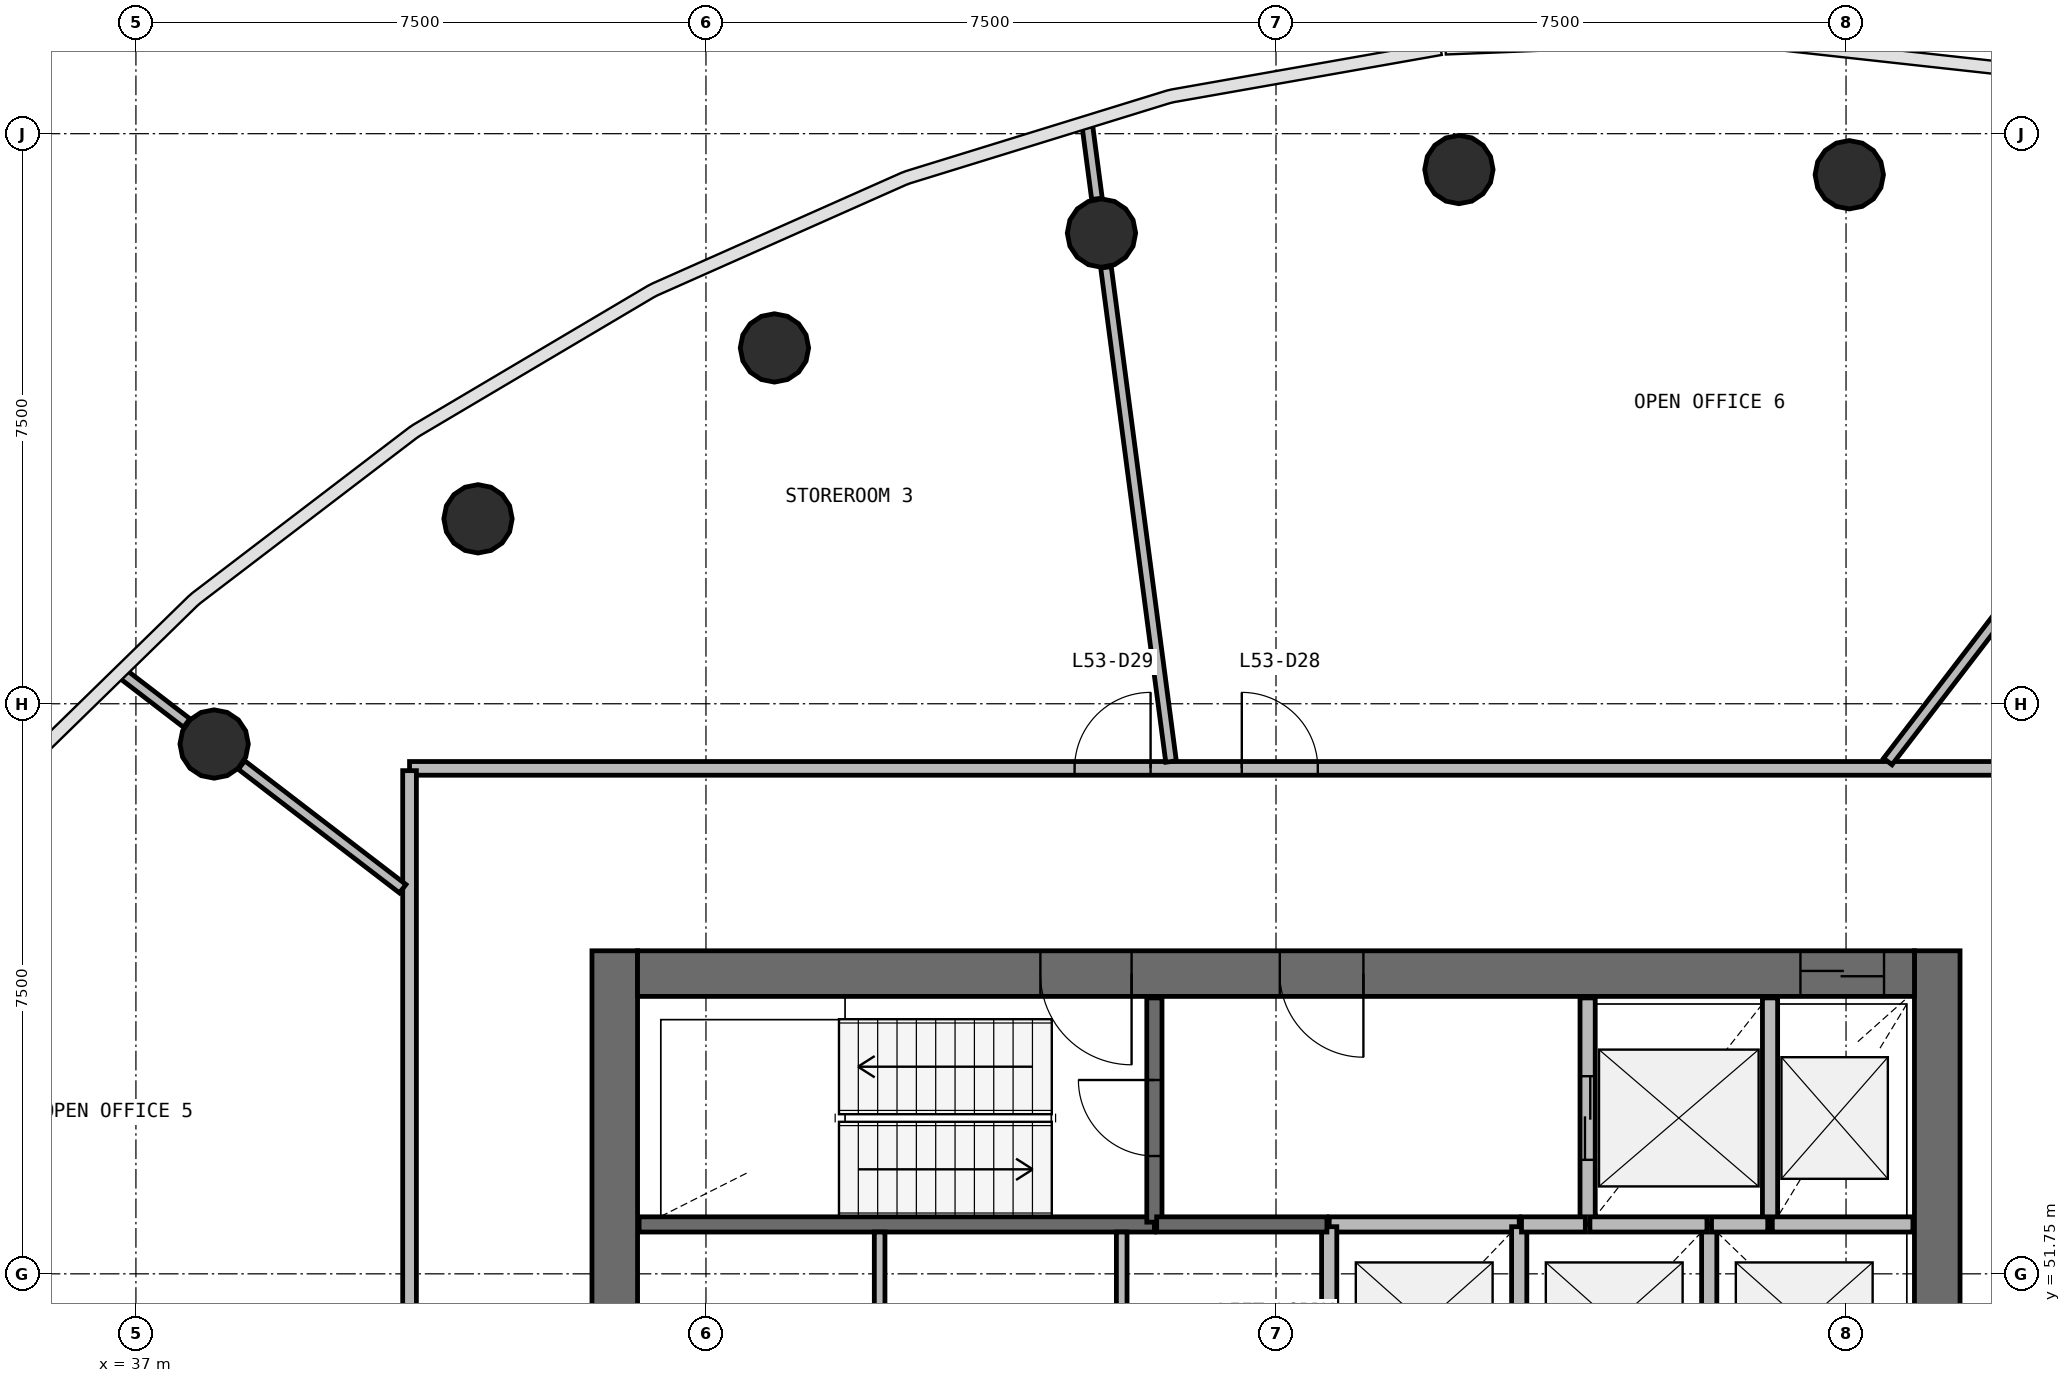
"""IFC4 building model, lengths in metres.
Left out: names, types, materials, properties, quantities, classifications, styles, units other than length and angle.
Written with IfcOpenShell. Run it as: python <this file> out.ifc"""

import sys

from ifc_helpers import new_model, si_unit, direction, frame, frame_2d, origin, origin_2d, place, context, subcontext, project, spatial, rectangle, circle, extrude, source, transform, mapped, element, fill, save


model = new_model("IFC4")
c1 = context("Model", 3, precision=1e-05, world=origin(), true_north=direction((0.0, 1.0)))
c2 = subcontext(c1, "Body", "Model", "MODEL_VIEW")
j1 = project(units=[si_unit("LENGTHUNIT", "METRE"), si_unit("PLANEANGLEUNIT", "RADIAN")], contexts=[c1])
p1 = place(None, origin())
s1 = spatial("IfcSite", under=j1, at=p1, CompositionType="ELEMENT")
p2 = place(p1, origin())
s2 = spatial("IfcBuilding", under=s1, at=p2, CompositionType="ELEMENT")
p3 = place(p2, frame((0.0, 0.0, 218.9)))
s3 = spatial("IfcBuildingStorey", under=s2, at=p3, CompositionType="ELEMENT", Elevation=218.9)
p4 = place(p3, frame((60.7, 40.0, 0.0), z_axis=(0.0, 0.0, 1.0), x_axis=(0.0, 1.0, 0.0)))
e1 = element("IfcWall", 1, at=p4, inside=s3, PredefinedType="SHEAR", context=c2, shape_type="SweptSolid", body=[
    extrude(rectangle(XDim=16.0, YDim=0.6, at=frame_2d((8.0, 0.0))), origin(), (0.0, 0.0, 1.0), 3.9),
])
p5 = place(p4, frame((7.1, 0.0, 0.0)))
e2 = element("IfcOpeningElement", 2, at=p5, cuts=e1, PredefinedType="OPENING", context=c2, shape_type="SweptSolid", body=[
    extrude(rectangle(XDim=1.8, YDim=2.1, at=frame_2d((0.9, 1.05))), frame((0.0, 0.31, 0.0), z_axis=(0.0, -1.0, 0.0), x_axis=(1.0, 0.0, 0.0)), (0.0, 0.0, 1.0), 0.62),
])
p6 = place(p3, frame((43.3, 56.0, 0.0), z_axis=(0.0, 0.0, 1.0), x_axis=(0.0, -1.0, 0.0)))
e3 = element("IfcWall", 3, at=p6, inside=s3, PredefinedType="SHEAR", context=c2, shape_type="SweptSolid", body=[
    extrude(rectangle(XDim=16.0, YDim=0.6, at=frame_2d((8.0, 0.0))), origin(), (0.0, 0.0, 1.0), 3.9),
])
p7 = place(p6, frame((7.1, 0.0, 0.0)))
e4 = element("IfcOpeningElement", 4, at=p7, cuts=e3, PredefinedType="OPENING", context=c2, shape_type="SweptSolid", body=[
    extrude(rectangle(XDim=1.8, YDim=2.1, at=frame_2d((0.9, 1.05))), frame((0.0, 0.31, 0.0), z_axis=(0.0, -1.0, 0.0), x_axis=(1.0, 0.0, 0.0)), (0.0, 0.0, 1.0), 0.62),
])
p8 = place(p3, frame((60.4, 55.7, 0.0), z_axis=(0.0, 0.0, 1.0), x_axis=(-1.0, 0.0, 0.0)))
e5 = element("IfcWall", 5, at=p8, inside=s3, PredefinedType="SHEAR", context=c2, shape_type="SweptSolid", body=[
    extrude(rectangle(XDim=16.8, YDim=0.6, at=frame_2d((8.4, 0.0))), origin(), (0.0, 0.0, 1.0), 3.9),
])
p9 = place(p8, frame((0.4, 0.0, 0.0)))
e6 = element("IfcOpeningElement", 6, at=p9, cuts=e5, PredefinedType="OPENING", context=c2, shape_type="SweptSolid", body=[
    extrude(rectangle(XDim=1.1, YDim=2.1, at=frame_2d((0.55, 1.05))), frame((0.0, 0.31, 0.0), z_axis=(0.0, -1.0, 0.0), x_axis=(1.0, 0.0, 0.0)), (0.0, 0.0, 1.0), 0.62),
])
p10 = place(p8, frame((10.3, 0.0, 0.0)))
e7 = element("IfcOpeningElement", 7, at=p10, cuts=e5, PredefinedType="OPENING", context=c2, shape_type="SweptSolid", body=[
    extrude(rectangle(XDim=1.2, YDim=2.1, at=frame_2d((0.6, 1.05))), frame((0.0, 0.31, 0.0), z_axis=(0.0, -1.0, 0.0), x_axis=(1.0, 0.0, 0.0)), (0.0, 0.0, 1.0), 0.62),
])
p11 = place(p8, frame((7.25, 0.0, 0.0)))
e8 = element("IfcOpeningElement", 8, at=p11, cuts=e5, PredefinedType="OPENING", context=c2, shape_type="SweptSolid", body=[
    extrude(rectangle(XDim=1.1, YDim=2.1, at=frame_2d((0.55, 1.05))), frame((0.0, 0.31, 0.0), z_axis=(0.0, -1.0, 0.0), x_axis=(1.0, 0.0, 0.0)), (0.0, 0.0, 1.0), 0.62),
])
m1 = source(origin(), c2, "Body", "SweptSolid", [
    extrude(circle(Radius=0.45, at=origin_2d()), origin(), (0.0, 0.0, 1.0), 3.9),
])
for number, where, z_axis, x_axis in (
    (9, (59.543, 66.21, 0.0), (0.0, 0.0, 1.0), (1.0, 0.0, 0.0)),
    (10, (54.406, 66.278, 0.0), (0.0, 0.0, 1.0), (1.0, 0.0, 0.0)),
    (11, (49.704, 65.442, 0.0), (0.0, 0.0, 1.0), (1.0, 0.0, 0.0)),
    (12, (45.401, 63.931, 0.0), (0.0, 0.0, 1.0), (1.0, 0.0, 0.0)),
    (13, (41.501, 61.683, 0.0), (0.0, 0.0, 1.0), (1.0, 0.0, 0.0)),
    (14, (38.029, 58.72, 0.0), (0.0, 0.0, 1.0), (1.0, 0.0, 0.0)),
):
    element("IfcColumn", number, at=place(p3, frame(where, z_axis=z_axis, x_axis=x_axis)), inside=s3, PredefinedType="COLUMN", context=c2, shape_type="MappedRepresentation", body=[
        mapped(m1, transform((0.0, 0.0, 0.0), scale=1.0)),
    ])
p12 = place(p3, frame((43.62, 52.4, 0.0), z_axis=(0.0, 0.0, 1.0), x_axis=(1.0, 0.0, 0.0)))
e15 = element("IfcWall", 15, at=p12, inside=s3, PredefinedType="SOLIDWALL", context=c2, shape_type="SweptSolid", body=[
    extrude(rectangle(XDim=6.78, YDim=0.2, at=frame_2d((3.39, 0.0))), origin(), (0.0, 0.0, 1.0), 3.58),
])
p13 = place(p3, frame((50.4, 52.43, 0.0), z_axis=(0.0, 0.0, 1.0), x_axis=(0.0, 1.0, 0.0)))
e16 = element("IfcWall", 16, at=p13, inside=s3, PredefinedType="SOLIDWALL", context=c2, shape_type="SweptSolid", body=[
    extrude(rectangle(XDim=2.95, YDim=0.2, at=frame_2d((1.475, 0.0))), origin(), (0.0, 0.0, 1.0), 3.58),
])
p14 = place(p13, frame((0.87, 0.0, 0.0)))
e17 = element("IfcOpeningElement", 17, at=p14, cuts=e16, PredefinedType="OPENING", context=c2, shape_type="SweptSolid", body=[
    extrude(rectangle(XDim=1.0, YDim=2.1, at=frame_2d((0.5, 1.05))), frame((0.0, 0.11, 0.0), z_axis=(0.0, -1.0, 0.0), x_axis=(1.0, 0.0, 0.0)), (0.0, 0.0, 1.0), 0.22),
])
p15 = place(p3, frame((56.1, 55.38, 0.0), z_axis=(0.0, 0.0, 1.0), x_axis=(0.0, -1.0, 0.0)))
e18 = element("IfcWall", 18, at=p15, inside=s3, PredefinedType="SOLIDWALL", context=c2, shape_type="SweptSolid", body=[
    extrude(rectangle(XDim=2.98, YDim=0.2, at=frame_2d((1.49, 0.0))), origin(), (0.0, 0.0, 1.0), 3.58),
])
p16 = place(p15, frame((1.03, 0.0, 0.0)))
e19 = element("IfcOpeningElement", 19, at=p16, cuts=e18, PredefinedType="OPENING", context=c2, shape_type="SweptSolid", body=[
    extrude(rectangle(XDim=1.1, YDim=2.1, at=frame_2d((0.55, 1.05))), frame((0.0, 0.11, 0.0), z_axis=(0.0, -1.0, 0.0), x_axis=(1.0, 0.0, 0.0)), (0.0, 0.0, 1.0), 0.22),
])
p17 = place(p3, frame((58.5, 52.4, 0.0), z_axis=(0.0, 0.0, 1.0), x_axis=(0.0, 1.0, 0.0)))
e20 = element("IfcWall", 20, at=p17, inside=s3, PredefinedType="SOLIDWALL", context=c2, shape_type="SweptSolid", body=[
    extrude(rectangle(XDim=2.98, YDim=0.2, at=frame_2d((1.49, 0.0))), origin(), (0.0, 0.0, 1.0), 3.58),
])
p18 = place(p3, frame((55.2, 52.4, 0.0), z_axis=(0.0, 0.0, 1.0), x_axis=(-1.0, 0.0, 0.0)))
e21 = element("IfcWall", 21, at=p18, inside=s3, PredefinedType="SOLIDWALL", context=c2, shape_type="SweptSolid", body=[
    extrude(rectangle(XDim=2.5, YDim=0.2, at=frame_2d((1.25, 0.0))), origin(), (0.0, 0.0, 1.0), 3.58),
])
for number, where, z_axis, x_axis in (
    (22, (52.7, 52.37, 0.0), (0.0, 0.0, 1.0), (0.0, -1.0, 0.0)),
    (23, (55.2, 50.01, 0.0), (0.0, 0.0, 1.0), (0.0, 1.0, 0.0)),
):
    element("IfcWall", number, at=place(p3, frame(where, z_axis=z_axis, x_axis=x_axis)), inside=s3, PredefinedType="SOLIDWALL", context=c2, shape_type="SweptSolid", body=[
        extrude(rectangle(XDim=2.36, YDim=0.2, at=frame_2d((1.18, 0.0))), origin(), (0.0, 0.0, 1.0), 3.58),
    ])
p19 = place(p3, frame((57.7, 50.01, 0.0), z_axis=(0.0, 0.0, 1.0), x_axis=(0.0, 1.0, 0.0)))
e24 = element("IfcWall", 24, at=p19, inside=s3, PredefinedType="SOLIDWALL", context=c2, shape_type="SweptSolid", body=[
    extrude(rectangle(XDim=2.39, YDim=0.2, at=frame_2d((1.195, 0.0))), origin(), (0.0, 0.0, 1.0), 3.58),
])
p20 = place(p3, frame((50.43, 52.4, 0.0), z_axis=(0.0, 0.0, 1.0), x_axis=(1.0, 0.0, 0.0)))
e25 = element("IfcWall", 25, at=p20, inside=s3, PredefinedType="SOLIDWALL", context=c2, shape_type="SweptSolid", body=[
    extrude(rectangle(XDim=2.24, YDim=0.2, at=frame_2d((1.12, 0.0))), origin(), (0.0, 0.0, 1.0), 3.58),
])
p21 = place(p3, frame((60.38, 52.4, 0.0), z_axis=(0.0, 0.0, 1.0), x_axis=(-1.0, 0.0, 0.0)))
e26 = element("IfcWall", 26, at=p21, inside=s3, PredefinedType="SOLIDWALL", context=c2, shape_type="SweptSolid", body=[
    extrude(rectangle(XDim=1.85, YDim=0.2, at=frame_2d((0.925, 0.0))), origin(), (0.0, 0.0, 1.0), 3.58),
])
p22 = place(p3, frame((57.67, 52.4, 0.0), z_axis=(0.0, 0.0, 1.0), x_axis=(-1.0, 0.0, 0.0)))
e27 = element("IfcWall", 27, at=p22, inside=s3, PredefinedType="SOLIDWALL", context=c2, shape_type="SweptSolid", body=[
    extrude(rectangle(XDim=1.54, YDim=0.2, at=frame_2d((0.77, 0.0))), origin(), (0.0, 0.0, 1.0), 3.58),
])
p23 = place(p3, frame((56.07, 52.4, 0.0), z_axis=(0.0, 0.0, 1.0), x_axis=(-1.0, 0.0, 0.0)))
e28 = element("IfcWall", 28, at=p23, inside=s3, PredefinedType="SOLIDWALL", context=c2, shape_type="SweptSolid", body=[
    extrude(rectangle(XDim=0.84, YDim=0.2, at=frame_2d((0.42, 0.0))), origin(), (0.0, 0.0, 1.0), 3.58),
])
p24 = place(p3, frame((58.47, 52.4, 0.0), z_axis=(0.0, 0.0, 1.0), x_axis=(-1.0, 0.0, 0.0)))
e29 = element("IfcWall", 29, at=p24, inside=s3, PredefinedType="SOLIDWALL", context=c2, shape_type="SweptSolid", body=[
    extrude(rectangle(XDim=0.74, YDim=0.2, at=frame_2d((0.37, 0.0))), origin(), (0.0, 0.0, 1.0), 3.58),
])
p25 = place(p3, frame((40.6, 58.4, 0.0), z_axis=(0.0, 0.0, 1.0), x_axis=(1.0, 0.0, 0.0)))
e30 = element("IfcWall", 30, at=p25, inside=s3, PredefinedType="PARTITIONING", context=c2, shape_type="SweptSolid", body=[
    extrude(rectangle(XDim=22.8, YDim=0.18, at=frame_2d((11.4, 0.0))), origin(), (0.0, 0.0, 1.0), 2.88),
])
p26 = place(p25, frame((10.95, 0.0, 0.0)))
e31 = element("IfcOpeningElement", 31, at=p26, cuts=e30, PredefinedType="OPENING", context=c2, shape_type="SweptSolid", body=[
    extrude(rectangle(XDim=1.0, YDim=2.1, at=frame_2d((0.5, 1.05))), frame((0.0, 0.1, 0.0), z_axis=(0.0, -1.0, 0.0), x_axis=(1.0, 0.0, 0.0)), (0.0, 0.0, 1.0), 0.2),
])
p27 = place(p25, frame((8.75, 0.0, 0.0)))
e32 = element("IfcOpeningElement", 32, at=p27, cuts=e30, PredefinedType="OPENING", context=c2, shape_type="SweptSolid", body=[
    extrude(rectangle(XDim=1.0, YDim=2.1, at=frame_2d((0.5, 1.05))), frame((0.0, 0.1, 0.0), z_axis=(0.0, -1.0, 0.0), x_axis=(1.0, 0.0, 0.0)), (0.0, 0.0, 1.0), 0.2),
])
p28 = place(p3, frame((40.6, 37.63, 0.0), z_axis=(0.0, 0.0, 1.0), x_axis=(0.0, 1.0, 0.0)))
e33 = element("IfcWall", 33, at=p28, inside=s3, PredefinedType="PARTITIONING", context=c2, shape_type="SweptSolid", body=[
    extrude(rectangle(XDim=20.74, YDim=0.18, at=frame_2d((10.37, 0.0))), origin(), (0.0, 0.0, 1.0), 2.88),
])
p29 = place(p28, frame((12.09, 0.0, 0.0)))
e34 = element("IfcOpeningElement", 34, at=p29, cuts=e33, PredefinedType="OPENING", context=c2, shape_type="SweptSolid", body=[
    extrude(rectangle(XDim=1.0, YDim=2.1, at=frame_2d((0.5, 1.05))), frame((0.0, 0.1, 0.0), z_axis=(0.0, -1.0, 0.0), x_axis=(1.0, 0.0, 0.0)), (0.0, 0.0, 1.0), 0.2),
])
p30 = place(p28, frame((9.89, 0.0, 0.0)))
e35 = element("IfcOpeningElement", 35, at=p30, cuts=e33, PredefinedType="OPENING", context=c2, shape_type="SweptSolid", body=[
    extrude(rectangle(XDim=1.0, YDim=2.1, at=frame_2d((0.5, 1.05))), frame((0.0, 0.1, 0.0), z_axis=(0.0, -1.0, 0.0), x_axis=(1.0, 0.0, 0.0)), (0.0, 0.0, 1.0), 0.2),
])
p31 = place(p3, frame((60.049, 58.49, 0.0), z_axis=(0.0, 0.0, 1.0), x_axis=(0.608758977351, 0.793355221508, 0.0)))
e36 = element("IfcWall", 36, at=p31, inside=s3, PredefinedType="PARTITIONING", context=c2, shape_type="SweptSolid", body=[
    extrude(rectangle(XDim=7.528, YDim=0.14, at=frame_2d((3.764, 0.0))), origin(), (0.0, 0.0, 1.0), 2.88),
])
p32 = place(p3, frame((50.619, 58.49, 0.0), z_axis=(0.0, 0.0, 1.0), x_axis=(-0.130519996386, 0.991445677051, 0.0)))
e37 = element("IfcWall", 37, at=p32, inside=s3, PredefinedType="PARTITIONING", context=c2, shape_type="SweptSolid", body=[
    extrude(rectangle(XDim=6.558, YDim=0.14, at=frame_2d((3.279, 0.0))), origin(), (0.0, 0.0, 1.0), 2.88),
])
p33 = place(p3, frame((40.51, 56.817, 0.0), z_axis=(0.0, 0.0, 1.0), x_axis=(-0.793363703091, 0.608747923707, 0.0)))
e38 = element("IfcWall", 38, at=p33, inside=s3, PredefinedType="PARTITIONING", context=c2, shape_type="SweptSolid", body=[
    extrude(rectangle(XDim=2.673, YDim=0.14, at=frame_2d((1.336, 0.0))), origin(), (0.0, 0.0, 1.0), 2.88),
])
for number, where, z_axis, x_axis in (
    (39, (46.785, 50.01, 0.0), (0.0, 0.0, 1.0), (0.0, 1.0, 0.0)),
    (40, (49.97, 50.01, 0.0), (0.0, 0.0, 1.0), (0.0, 1.0, 0.0)),
):
    element("IfcWall", number, at=place(p3, frame(where, z_axis=z_axis, x_axis=x_axis)), inside=s3, PredefinedType="PARTITIONING", context=c2, shape_type="SweptSolid", body=[
        extrude(rectangle(XDim=2.29, YDim=0.14, at=frame_2d((1.145, 0.0))), origin(), (0.0, 0.0, 1.0), 2.88),
    ])
p34 = place(p3, frame((37.668, 58.997, 0.0), z_axis=(0.0, 0.0, 1.0), x_axis=(-0.793388088797, 0.608716141198, 0.0)))
e41 = element("IfcWall", 41, at=p34, inside=s3, PredefinedType="PARTITIONING", context=c2, shape_type="SweptSolid", body=[
    extrude(rectangle(XDim=1.044, YDim=0.14, at=frame_2d((0.522, 0.0))), origin(), (0.0, 0.0, 1.0), 2.88),
])
p35 = place(p3, frame((49.644, 65.893, 0.0), z_axis=(0.0, 0.0, 1.0), x_axis=(-0.130507364932, 0.991447339852, 0.0)))
e42 = element("IfcWall", 42, at=p35, inside=s3, PredefinedType="PARTITIONING", context=c2, shape_type="SweptSolid", body=[
    extrude(rectangle(XDim=0.956, YDim=0.14, at=frame_2d((0.478, 0.0))), origin(), (0.0, 0.0, 1.0), 2.88),
])
m2 = source(origin(), c2, "Body", "SweptSolid", [
    extrude(rectangle(XDim=1.1, YDim=2.1, at=frame_2d((0.55, 1.05))), frame((0.0, 0.025, 0.0), z_axis=(0.0, -1.0, 0.0), x_axis=(1.0, 0.0, 0.0)), (0.0, 0.0, 1.0), 0.05),
])
p36 = place(p16, origin())
e43 = element("IfcDoor", 43, at=p36, inside=s3, OperationType="DOUBLE_DOOR_SLIDING", PredefinedType="USERDEFINED", context=c2, shape_type="MappedRepresentation", body=[
    mapped(m2, transform((0.0, 0.0, 0.0), scale=1.0)),
])
fill(e19, e43)
p37 = place(p9, origin())
e44 = element("IfcDoor", 44, at=p37, inside=s3, OperationType="DOUBLE_DOOR_SLIDING", PredefinedType="USERDEFINED", context=c2, shape_type="MappedRepresentation", body=[
    mapped(m2, transform((0.0, 0.0, 0.0), scale=1.0)),
])
fill(e6, e44)
m3 = source(origin(), c2, "Body", "SweptSolid", [
    extrude(rectangle(XDim=1.2, YDim=2.1, at=frame_2d((0.6, 1.05))), frame((0.0, 0.025, 0.0), z_axis=(0.0, -1.0, 0.0), x_axis=(1.0, 0.0, 0.0)), (0.0, 0.0, 1.0), 0.05),
])
p38 = place(p10, origin())
e45 = element("IfcDoor", 45, at=p38, inside=s3, OperationType="SINGLE_SWING_LEFT", PredefinedType="DOOR", context=c2, shape_type="MappedRepresentation", body=[
    mapped(m3, transform((0.0, 0.0, 0.0), scale=1.0)),
])
fill(e7, e45)
m4 = source(origin(), c2, "Body", "SweptSolid", [
    extrude(rectangle(XDim=1.0, YDim=2.1, at=frame_2d((0.5, 1.05))), frame((0.0, 0.025, 0.0), z_axis=(0.0, -1.0, 0.0), x_axis=(1.0, 0.0, 0.0)), (0.0, 0.0, 1.0), 0.05),
])
p39 = place(p14, origin())
e46 = element("IfcDoor", 46, at=p39, inside=s3, OperationType="SINGLE_SWING_RIGHT", PredefinedType="DOOR", context=c2, shape_type="MappedRepresentation", body=[
    mapped(m4, transform((0.0, 0.0, 0.0), scale=1.0)),
])
fill(e17, e46)
m5 = source(origin(), c2, "Body", "SweptSolid", [
    extrude(rectangle(XDim=1.1, YDim=2.1, at=frame_2d((0.55, 1.05))), frame((0.0, 0.025, 0.0), z_axis=(0.0, -1.0, 0.0), x_axis=(1.0, 0.0, 0.0)), (0.0, 0.0, 1.0), 0.05),
])
p40 = place(p11, origin())
e47 = element("IfcDoor", 47, at=p40, inside=s3, OperationType="SINGLE_SWING_LEFT", PredefinedType="DOOR", context=c2, shape_type="MappedRepresentation", body=[
    mapped(m5, transform((0.0, 0.0, 0.0), scale=1.0)),
])
fill(e8, e47)
m6 = source(origin(), c2, "Body", "SweptSolid", [
    extrude(rectangle(XDim=1.0, YDim=2.1, at=frame_2d((0.5, 1.05))), frame((0.0, 0.025, 0.0), z_axis=(0.0, -1.0, 0.0), x_axis=(1.0, 0.0, 0.0)), (0.0, 0.0, 1.0), 0.05),
])
p41 = place(p26, origin())
e48 = element("IfcDoor", 48, at=p41, inside=s3, OperationType="SINGLE_SWING_LEFT", PredefinedType="DOOR", context=c2, shape_type="MappedRepresentation", body=[
    mapped(m6, transform((0.0, 0.0, 0.0), scale=1.0)),
])
fill(e31, e48)
p42 = place(p27, origin())
e49 = element("IfcDoor", 49, at=p42, inside=s3, OperationType="SINGLE_SWING_RIGHT", PredefinedType="DOOR", context=c2, shape_type="MappedRepresentation", body=[
    mapped(m6, transform((0.0, 0.0, 0.0), scale=1.0)),
])
fill(e32, e49)
save(model, sys.argv[1])
